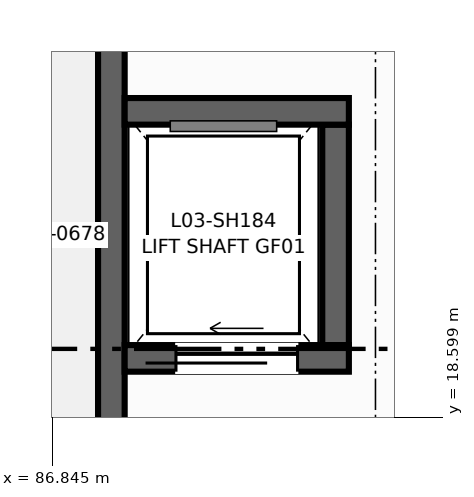
"""IFC4 building model, lengths in metres.
Left out: names, types, materials, properties, quantities, classifications, styles, units other than length and angle.
Written with IfcOpenShell. Run it as: python <this file> out.ifc"""

import sys

from ifc_helpers import new_model, si_unit, direction, frame, frame_2d, origin, place, context, subcontext, project, spatial, rectangle, extrude, element, fill, save


model = new_model("IFC4")
c1 = context("Model", 3, precision=1e-05, world=origin(), true_north=direction((0.0, 1.0)))
c2 = subcontext(c1, "Body", "Model", "MODEL_VIEW")
j1 = project(units=[si_unit("LENGTHUNIT", "METRE"), si_unit("PLANEANGLEUNIT", "RADIAN")], contexts=[c1])
p1 = place(None, origin())
s1 = spatial("IfcSite", under=j1, at=p1, CompositionType="ELEMENT")
p2 = place(p1, origin())
s2 = spatial("IfcBuilding", under=s1, at=p2, CompositionType="ELEMENT")
p3 = place(p2, frame((0.0, 0.0, 13.5)))
s3 = spatial("IfcBuildingStorey", under=s2, at=p3, CompositionType="ELEMENT", Elevation=13.5)
p4 = place(p3, frame((87.625, 18.5, 0.0), z_axis=(0.0, 0.0, 1.0), x_axis=(0.0, 1.0, 0.0)))
e1 = element("IfcWall", 1, at=p4, inside=s3, PredefinedType="SHEAR", context=c2, shape_type="SweptSolid", body=[
    extrude(rectangle(XDim=5.0, YDim=0.35, at=frame_2d((2.5, 0.0))), origin(), (0.0, 0.0, 1.0), 4.25),
])
p5 = place(p3, frame((90.575, 19.55, 0.0), z_axis=(0.0, 0.0, 1.0), x_axis=(0.0, 1.0, 0.0)))
e2 = element("IfcWall", 2, at=p5, inside=s3, PredefinedType="SHEAR", context=c2, shape_type="SweptSolid", body=[
    extrude(rectangle(XDim=2.9, YDim=0.35, at=frame_2d((1.45, 0.0))), origin(), (0.0, 0.0, 1.0), 4.25),
])
p6 = place(p3, frame((87.8, 19.375, 0.0), z_axis=(0.0, 0.0, 1.0), x_axis=(1.0, 0.0, 0.0)))
e3 = element("IfcWall", 3, at=p6, inside=s3, PredefinedType="SHEAR", context=c2, shape_type="SweptSolid", body=[
    extrude(rectangle(XDim=2.95, YDim=0.35, at=frame_2d((1.475, 0.0))), origin(), (0.0, 0.0, 1.0), 4.25),
])
p7 = place(p6, frame((0.675, 0.0, 0.0)))
e4 = element("IfcOpeningElement", 4, at=p7, cuts=e3, PredefinedType="OPENING", context=c2, shape_type="SweptSolid", body=[
    extrude(rectangle(XDim=1.6, YDim=2.35, at=frame_2d((0.8, 1.175))), frame((0.0, 0.185, 0.0), z_axis=(0.0, -1.0, 0.0), x_axis=(1.0, 0.0, 0.0)), (0.0, 0.0, 1.0), 0.37),
])
p8 = place(p3, frame((87.8, 22.625, 0.0), z_axis=(0.0, 0.0, 1.0), x_axis=(1.0, 0.0, 0.0)))
e5 = element("IfcWall", 5, at=p8, inside=s3, PredefinedType="SHEAR", context=c2, shape_type="SweptSolid", body=[
    extrude(rectangle(XDim=2.95, YDim=0.35, at=frame_2d((1.475, 0.0))), origin(), (0.0, 0.0, 1.0), 4.25),
])
p9 = place(p7, origin())
e6 = element("IfcDoor", 6, at=p9, inside=s3, OperationType="SLIDING_TO_LEFT", PredefinedType="DOOR", context=c2, shape_type="SweptSolid", body=[
    extrude(rectangle(XDim=1.6, YDim=2.35, at=frame_2d((0.8, 1.175))), frame((0.0, 0.025, 0.0), z_axis=(0.0, -1.0, 0.0), x_axis=(1.0, 0.0, 0.0)), (0.0, 0.0, 1.0), 0.05),
])
fill(e4, e6)
save(model, sys.argv[1])
